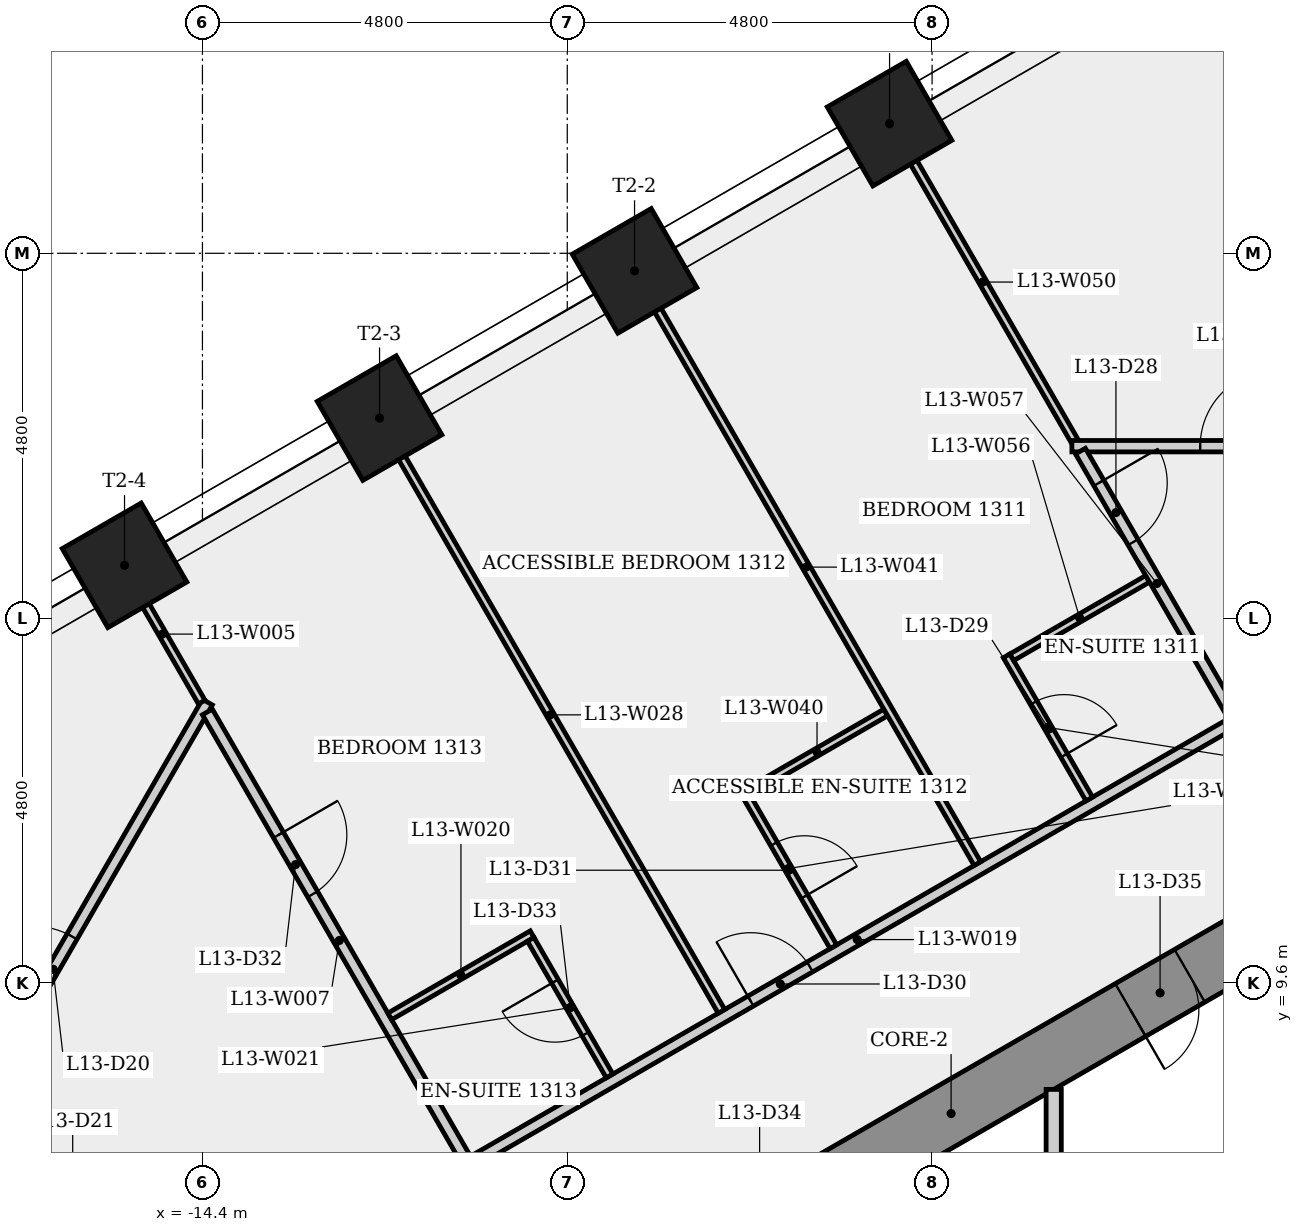
"""IFC4 building model, lengths in metres.
Left out: names, types, materials, properties, quantities, classifications, styles, units other than length and angle.
Written with IfcOpenShell. Run it as: python <this file> out.ifc"""

import sys

from ifc_helpers import new_model, si_unit, direction, frame, frame_2d, origin, origin_2d, place, context, subcontext, project, spatial, rectangle, extrude, element, fill, save


model = new_model("IFC4")
c1 = context("Model", 3, precision=1e-05, world=origin(), true_north=direction((0.0, 1.0)))
c2 = subcontext(c1, "Body", "Model", "MODEL_VIEW")
j1 = project(units=[si_unit("LENGTHUNIT", "METRE"), si_unit("PLANEANGLEUNIT", "RADIAN")], contexts=[c1])
p1 = place(None, origin())
s1 = spatial("IfcSite", under=j1, at=p1, CompositionType="ELEMENT")
p2 = place(p1, origin())
s2 = spatial("IfcBuilding", under=s1, at=p2, CompositionType="ELEMENT")
p3 = place(p2, frame((0.0, 0.0, 52.7)))
s3 = spatial("IfcBuildingStorey", under=s2, at=p3, CompositionType="ELEMENT", Elevation=52.7)
p4 = place(p3, frame((0.2, 10.623, 0.0), z_axis=(0.0, 0.0, 1.0), x_axis=(-0.866023993627, -0.500002442456, 0.0)))
e1 = element("IfcWall", 1, at=p4, inside=s3, PredefinedType="SHEAR", context=c2, shape_type="SweptSolid", body=[
    extrude(rectangle(XDim=10.97, YDim=0.8, at=frame_2d((5.485, 0.0))), origin(), (0.0, 0.0, 1.0), 3.4),
])
p5 = place(p4, frame((7.944, 0.0, 0.0)))
e2 = element("IfcOpeningElement", 2, at=p5, cuts=e1, PredefinedType="OPENING", context=c2, shape_type="SweptSolid", body=[
    extrude(rectangle(XDim=0.9, YDim=2.1, at=frame_2d((0.45, 1.05))), frame((0.0, 0.41, 0.0), z_axis=(0.0, -1.0, 0.0), x_axis=(1.0, 0.0, 0.0)), (0.0, 0.0, 1.0), 0.82),
])
p6 = place(p4, frame((1.86, 0.0, 0.0)))
e3 = element("IfcOpeningElement", 3, at=p6, cuts=e1, PredefinedType="OPENING", context=c2, shape_type="SweptSolid", body=[
    extrude(rectangle(XDim=0.9, YDim=2.1, at=frame_2d((0.45, 1.05))), frame((0.0, 0.41, 0.0), z_axis=(0.0, -1.0, 0.0), x_axis=(1.0, 0.0, 0.0)), (0.0, 0.0, 1.0), 0.82),
])
for number, where, z_axis, x_axis in (
    (4, (-5.36, 20.906, 0.0), (0.0, 0.0, 1.0), (-0.5, 0.866, 0.0)),
    (5, (-8.715, 18.969, 0.0), (0.0, 0.0, 1.0), (-0.5, 0.866, 0.0)),
    (6, (-12.07, 17.031, 0.0), (0.0, 0.0, 1.0), (-0.5, 0.866, 0.0)),
    (7, (-15.425, 15.094, 0.0), (0.0, 0.0, 1.0), (-0.5, 0.866, 0.0)),
):
    element("IfcColumn", number, at=place(p3, frame(where, z_axis=z_axis, x_axis=x_axis)), inside=s3, PredefinedType="COLUMN", context=c2, shape_type="SweptSolid", body=[
        extrude(rectangle(XDim=1.2, YDim=1.2, at=origin_2d()), origin(), (0.0, 0.0, 1.0), 3.4),
    ])
p7 = place(p3, frame((-18.396, 6.26, 0.0), z_axis=(0.0, 0.0, 1.0), x_axis=(0.500005169787, 0.866022418986, 0.0)))
e8 = element("IfcWall", 8, at=p7, inside=s3, PredefinedType="PARTITIONING", context=c2, shape_type="SweptSolid", body=[
    extrude(rectangle(XDim=8.123, YDim=0.15, at=frame_2d((4.062, 0.0))), origin(), (0.0, 0.0, 1.0), 3.05),
])
p8 = place(p7, frame((3.561, 0.0, 0.0)))
e9 = element("IfcOpeningElement", 9, at=p8, cuts=e8, PredefinedType="OPENING", context=c2, shape_type="SweptSolid", body=[
    extrude(rectangle(XDim=1.0, YDim=2.1, at=frame_2d((0.5, 1.05))), frame((0.0, 0.085, 0.0), z_axis=(0.0, -1.0, 0.0), x_axis=(1.0, 0.0, 0.0)), (0.0, 0.0, 1.0), 0.17),
])
p9 = place(p3, frame((-15.443, 15.084, 0.0), z_axis=(0.0, 0.0, 1.0), x_axis=(0.500015708345, -0.866016334377, 0.0)))
e10 = element("IfcWall", 10, at=p9, inside=s3, PredefinedType="PARTITIONING", context=c2, shape_type="SweptSolid", body=[
    extrude(rectangle(XDim=2.066, YDim=0.1, at=frame_2d((1.033, 0.0))), origin(), (0.0, 0.0, 1.0), 3.05),
])
p10 = place(p3, frame((-14.335, 13.165, 0.0), z_axis=(0.0, 0.0, 1.0), x_axis=(0.499981158809, -0.866036281478, 0.0)))
e11 = element("IfcWall", 11, at=p10, inside=s3, PredefinedType="PARTITIONING", context=c2, shape_type="SweptSolid", body=[
    extrude(rectangle(XDim=6.944, YDim=0.15, at=frame_2d((3.472, 0.0))), origin(), (0.0, 0.0, 1.0), 3.05),
])
p11 = place(p10, frame((1.869, 0.0, 0.0)))
e12 = element("IfcOpeningElement", 12, at=p11, cuts=e11, PredefinedType="OPENING", context=c2, shape_type="SweptSolid", body=[
    extrude(rectangle(XDim=0.9, YDim=2.1, at=frame_2d((0.45, 1.05))), frame((0.0, 0.085, 0.0), z_axis=(0.0, -1.0, 0.0), x_axis=(1.0, 0.0, 0.0)), (0.0, 0.0, 1.0), 0.17),
])
p12 = place(p3, frame((-10.836, 7.254, 0.0), z_axis=(0.0, 0.0, 1.0), x_axis=(0.866028032582, 0.499995446761, 0.0)))
e13 = element("IfcWall", 13, at=p12, inside=s3, PredefinedType="PARTITIONING", context=c2, shape_type="SweptSolid", body=[
    extrude(rectangle(XDim=11.664, YDim=0.15, at=frame_2d((5.832, 0.0))), origin(), (0.0, 0.0, 1.0), 3.05),
])
p13 = place(p12, frame((4.213, 0.0, 0.0)))
e14 = element("IfcOpeningElement", 14, at=p13, cuts=e13, PredefinedType="OPENING", context=c2, shape_type="SweptSolid", body=[
    extrude(rectangle(XDim=0.9, YDim=2.1, at=frame_2d((0.45, 1.05))), frame((0.0, 0.085, 0.0), z_axis=(0.0, -1.0, 0.0), x_axis=(1.0, 0.0, 0.0)), (0.0, 0.0, 1.0), 0.17),
])
p14 = place(p3, frame((-10.062, 10.241, 0.0), z_axis=(0.0, 0.0, 1.0), x_axis=(-0.865997604128, -0.500048147326, 0.0)))
e15 = element("IfcWall", 15, at=p14, inside=s3, PredefinedType="PARTITIONING", context=c2, shape_type="SweptSolid", body=[
    extrude(rectangle(XDim=2.163, YDim=0.1, at=frame_2d((1.082, 0.0))), origin(), (0.0, 0.0, 1.0), 3.05),
])
p15 = place(p3, frame((-9.043, 8.375, 0.0), z_axis=(0.0, 0.0, 1.0), x_axis=(-0.500011000363, 0.866019052629, 0.0)))
e16 = element("IfcWall", 16, at=p15, inside=s3, PredefinedType="PARTITIONING", context=c2, shape_type="SweptSolid", body=[
    extrude(rectangle(XDim=2.075, YDim=0.1, at=frame_2d((1.038, 0.0))), origin(), (0.0, 0.0, 1.0), 3.05),
])
p16 = place(p15, frame((0.637, 0.0, 0.0)))
e17 = element("IfcOpeningElement", 17, at=p16, cuts=e16, PredefinedType="OPENING", context=c2, shape_type="SweptSolid", body=[
    extrude(rectangle(XDim=0.8, YDim=2.1, at=frame_2d((0.4, 1.05))), frame((0.0, 0.06, 0.0), z_axis=(0.0, -1.0, 0.0), x_axis=(1.0, 0.0, 0.0)), (0.0, 0.0, 1.0), 0.12),
])
p17 = place(p3, frame((-7.571, 9.226, 0.0), z_axis=(0.0, 0.0, 1.0), x_axis=(-0.499989081013, 0.866031707772, 0.0)))
e18 = element("IfcWall", 18, at=p17, inside=s3, PredefinedType="PARTITIONING", context=c2, shape_type="SweptSolid", body=[
    extrude(rectangle(XDim=9.01, YDim=0.1, at=frame_2d((4.505, 0.0))), origin(), (0.0, 0.0, 1.0), 3.05),
])
p18 = place(p3, frame((-7.286, 12.132, 0.0), z_axis=(0.0, 0.0, 1.0), x_axis=(0.499986429846, -0.866033238375, 0.0)))
e19 = element("IfcWall", 19, at=p18, inside=s3, PredefinedType="PARTITIONING", context=c2, shape_type="SweptSolid", body=[
    extrude(rectangle(XDim=2.375, YDim=0.1, at=frame_2d((1.188, 0.0))), origin(), (0.0, 0.0, 1.0), 3.05),
])
p19 = place(p18, frame((0.812, 0.0, 0.0)))
e20 = element("IfcOpeningElement", 20, at=p19, cuts=e19, PredefinedType="OPENING", context=c2, shape_type="SweptSolid", body=[
    extrude(rectangle(XDim=0.8, YDim=2.1, at=frame_2d((0.4, 1.05))), frame((0.0, 0.06, 0.0), z_axis=(0.0, -1.0, 0.0), x_axis=(1.0, 0.0, 0.0)), (0.0, 0.0, 1.0), 0.12),
])
p20 = place(p3, frame((-5.41, 13.158, 0.0), z_axis=(0.0, 0.0, 1.0), x_axis=(-0.866018117109, -0.50001262068, 0.0)))
e21 = element("IfcWall", 21, at=p20, inside=s3, PredefinedType="PARTITIONING", context=c2, shape_type="SweptSolid", body=[
    extrude(rectangle(XDim=2.088, YDim=0.1, at=frame_2d((1.044, 0.0))), origin(), (0.0, 0.0, 1.0), 3.05),
])
p21 = place(p3, frame((-8.709, 18.972, 0.0), z_axis=(0.0, 0.0, 1.0), x_axis=(0.499989081013, -0.866031707772, 0.0)))
e22 = element("IfcWall", 22, at=p21, inside=s3, PredefinedType="PARTITIONING", context=c2, shape_type="SweptSolid", body=[
    extrude(rectangle(XDim=9.01, YDim=0.1, at=frame_2d((4.505, 0.0))), origin(), (0.0, 0.0, 1.0), 3.05),
])
p22 = place(p3, frame((-3.819, 13.903, 0.0), z_axis=(0.0, 0.0, 1.0), x_axis=(0.500013916395, -0.866017369001, 0.0)))
e23 = element("IfcWall", 23, at=p22, inside=s3, PredefinedType="PARTITIONING", context=c2, shape_type="SweptSolid", body=[
    extrude(rectangle(XDim=2.175, YDim=0.1, at=frame_2d((1.088, 0.0))), origin(), (0.0, 0.0, 1.0), 3.05),
])
p23 = place(p22, frame((0.712, 0.0, 0.0)))
e24 = element("IfcOpeningElement", 24, at=p23, cuts=e23, PredefinedType="OPENING", context=c2, shape_type="SweptSolid", body=[
    extrude(rectangle(XDim=0.8, YDim=2.1, at=frame_2d((0.4, 1.05))), frame((0.0, 0.06, 0.0), z_axis=(0.0, -1.0, 0.0), x_axis=(1.0, 0.0, 0.0)), (0.0, 0.0, 1.0), 0.12),
])
p24 = place(p3, frame((-3.2, 8.198, 0.0), z_axis=(0.0, 0.0, 1.0), x_axis=(0.0, -1.0, 0.0)))
e25 = element("IfcWall", 25, at=p24, inside=s3, PredefinedType="PARTITIONING", context=c2, shape_type="SweptSolid", body=[
    extrude(rectangle(XDim=2.924, YDim=0.2, at=frame_2d((1.462, 0.0))), origin(), (0.0, 0.0, 1.0), 3.05),
])
p25 = place(p3, frame((-2.923, 16.727, 0.0), z_axis=(0.0, 0.0, 1.0), x_axis=(-0.500009339412, 0.866020011605, 0.0)))
e26 = element("IfcWall", 26, at=p25, inside=s3, PredefinedType="PARTITIONING", context=c2, shape_type="SweptSolid", body=[
    extrude(rectangle(XDim=4.837, YDim=0.1, at=frame_2d((2.419, 0.0))), origin(), (0.0, 0.0, 1.0), 3.05),
])
p26 = place(p3, frame((-2.961, 16.662, 0.0), z_axis=(0.0, 0.0, 1.0), x_axis=(1.0, 0.0, 0.0)))
e27 = element("IfcWall", 27, at=p26, inside=s3, PredefinedType="PARTITIONING", context=c2, shape_type="SweptSolid", body=[
    extrude(rectangle(XDim=4.342, YDim=0.15, at=frame_2d((2.171, 0.0))), origin(), (0.0, 0.0, 1.0), 3.05),
])
p27 = place(p26, frame((1.688, 0.0, 0.0)))
e28 = element("IfcOpeningElement", 28, at=p27, cuts=e27, PredefinedType="OPENING", context=c2, shape_type="SweptSolid", body=[
    extrude(rectangle(XDim=1.0, YDim=2.1, at=frame_2d((0.5, 1.05))), frame((0.0, 0.085, 0.0), z_axis=(0.0, -1.0, 0.0), x_axis=(1.0, 0.0, 0.0)), (0.0, 0.0, 1.0), 0.17),
])
p28 = place(p3, frame((-1.964, 14.916, 0.0), z_axis=(0.0, 0.0, 1.0), x_axis=(-0.866027928545, -0.499995626961, 0.0)))
e29 = element("IfcWall", 29, at=p28, inside=s3, PredefinedType="PARTITIONING", context=c2, shape_type="SweptSolid", body=[
    extrude(rectangle(XDim=2.063, YDim=0.1, at=frame_2d((1.031, 0.0))), origin(), (0.0, 0.0, 1.0), 3.05),
])
p29 = place(p3, frame((-2.848, 16.597, 0.0), z_axis=(0.0, 0.0, 1.0), x_axis=(0.500016677412, -0.866015774862, 0.0)))
e30 = element("IfcWall", 30, at=p29, inside=s3, PredefinedType="PARTITIONING", context=c2, shape_type="SweptSolid", body=[
    extrude(rectangle(XDim=4.022, YDim=0.15, at=frame_2d((2.011, 0.0))), origin(), (0.0, 0.0, 1.0), 3.05),
])
p30 = place(p29, frame((0.484, 0.0, 0.0)))
e31 = element("IfcOpeningElement", 31, at=p30, cuts=e30, PredefinedType="OPENING", context=c2, shape_type="SweptSolid", body=[
    extrude(rectangle(XDim=0.9, YDim=2.1, at=frame_2d((0.45, 1.05))), frame((0.0, 0.085, 0.0), z_axis=(0.0, -1.0, 0.0), x_axis=(1.0, 0.0, 0.0)), (0.0, 0.0, 1.0), 0.17),
])
p31 = place(p27, origin())
e32 = element("IfcDoor", 32, at=p31, inside=s3, OperationType="SINGLE_SWING_RIGHT", PredefinedType="DOOR", context=c2, shape_type="SweptSolid", body=[
    extrude(rectangle(XDim=1.0, YDim=2.1, at=frame_2d((0.5, 1.05))), frame((0.0, 0.025, 0.0), z_axis=(0.0, -1.0, 0.0), x_axis=(1.0, 0.0, 0.0)), (0.0, 0.0, 1.0), 0.05),
])
fill(e28, e32)
p32 = place(p8, origin())
e33 = element("IfcDoor", 33, at=p32, inside=s3, OperationType="SINGLE_SWING_LEFT", PredefinedType="DOOR", context=c2, shape_type="SweptSolid", body=[
    extrude(rectangle(XDim=1.0, YDim=2.1, at=frame_2d((0.5, 1.05))), frame((0.0, 0.025, 0.0), z_axis=(0.0, -1.0, 0.0), x_axis=(1.0, 0.0, 0.0)), (0.0, 0.0, 1.0), 0.05),
])
fill(e9, e33)
p33 = place(p30, origin())
e34 = element("IfcDoor", 34, at=p33, inside=s3, OperationType="SINGLE_SWING_LEFT", PredefinedType="DOOR", context=c2, shape_type="SweptSolid", body=[
    extrude(rectangle(XDim=0.9, YDim=2.1, at=frame_2d((0.45, 1.05))), frame((0.0, 0.025, 0.0), z_axis=(0.0, -1.0, 0.0), x_axis=(1.0, 0.0, 0.0)), (0.0, 0.0, 1.0), 0.05),
])
fill(e31, e34)
p34 = place(p23, origin())
e35 = element("IfcDoor", 35, at=p34, inside=s3, OperationType="SINGLE_SWING_RIGHT", PredefinedType="DOOR", context=c2, shape_type="SweptSolid", body=[
    extrude(rectangle(XDim=0.8, YDim=2.1, at=frame_2d((0.4, 1.05))), frame((0.0, 0.025, 0.0), z_axis=(0.0, -1.0, 0.0), x_axis=(1.0, 0.0, 0.0)), (0.0, 0.0, 1.0), 0.05),
])
fill(e24, e35)
p35 = place(p13, origin())
e36 = element("IfcDoor", 36, at=p35, inside=s3, OperationType="SINGLE_SWING_LEFT", PredefinedType="DOOR", context=c2, shape_type="SweptSolid", body=[
    extrude(rectangle(XDim=0.9, YDim=2.1, at=frame_2d((0.45, 1.05))), frame((0.0, 0.025, 0.0), z_axis=(0.0, -1.0, 0.0), x_axis=(1.0, 0.0, 0.0)), (0.0, 0.0, 1.0), 0.05),
])
fill(e14, e36)
p36 = place(p19, origin())
e37 = element("IfcDoor", 37, at=p36, inside=s3, OperationType="SINGLE_SWING_RIGHT", PredefinedType="DOOR", context=c2, shape_type="SweptSolid", body=[
    extrude(rectangle(XDim=0.8, YDim=2.1, at=frame_2d((0.4, 1.05))), frame((0.0, 0.025, 0.0), z_axis=(0.0, -1.0, 0.0), x_axis=(1.0, 0.0, 0.0)), (0.0, 0.0, 1.0), 0.05),
])
fill(e20, e37)
p37 = place(p11, origin())
e38 = element("IfcDoor", 38, at=p37, inside=s3, OperationType="SINGLE_SWING_LEFT", PredefinedType="DOOR", context=c2, shape_type="SweptSolid", body=[
    extrude(rectangle(XDim=0.9, YDim=2.1, at=frame_2d((0.45, 1.05))), frame((0.0, 0.025, 0.0), z_axis=(0.0, -1.0, 0.0), x_axis=(1.0, 0.0, 0.0)), (0.0, 0.0, 1.0), 0.05),
])
fill(e12, e38)
p38 = place(p16, origin())
e39 = element("IfcDoor", 39, at=p38, inside=s3, OperationType="SINGLE_SWING_RIGHT", PredefinedType="DOOR", context=c2, shape_type="SweptSolid", body=[
    extrude(rectangle(XDim=0.8, YDim=2.1, at=frame_2d((0.4, 1.05))), frame((0.0, 0.025, 0.0), z_axis=(0.0, -1.0, 0.0), x_axis=(1.0, 0.0, 0.0)), (0.0, 0.0, 1.0), 0.05),
])
fill(e17, e39)
p39 = place(p6, origin())
e40 = element("IfcDoor", 40, at=p39, inside=s3, OperationType="SINGLE_SWING_RIGHT", PredefinedType="DOOR", context=c2, shape_type="SweptSolid", body=[
    extrude(rectangle(XDim=0.9, YDim=2.1, at=frame_2d((0.45, 1.05))), frame((0.0, 0.025, 0.0), z_axis=(0.0, -1.0, 0.0), x_axis=(1.0, 0.0, 0.0)), (0.0, 0.0, 1.0), 0.05),
])
fill(e3, e40)
save(model, sys.argv[1])
